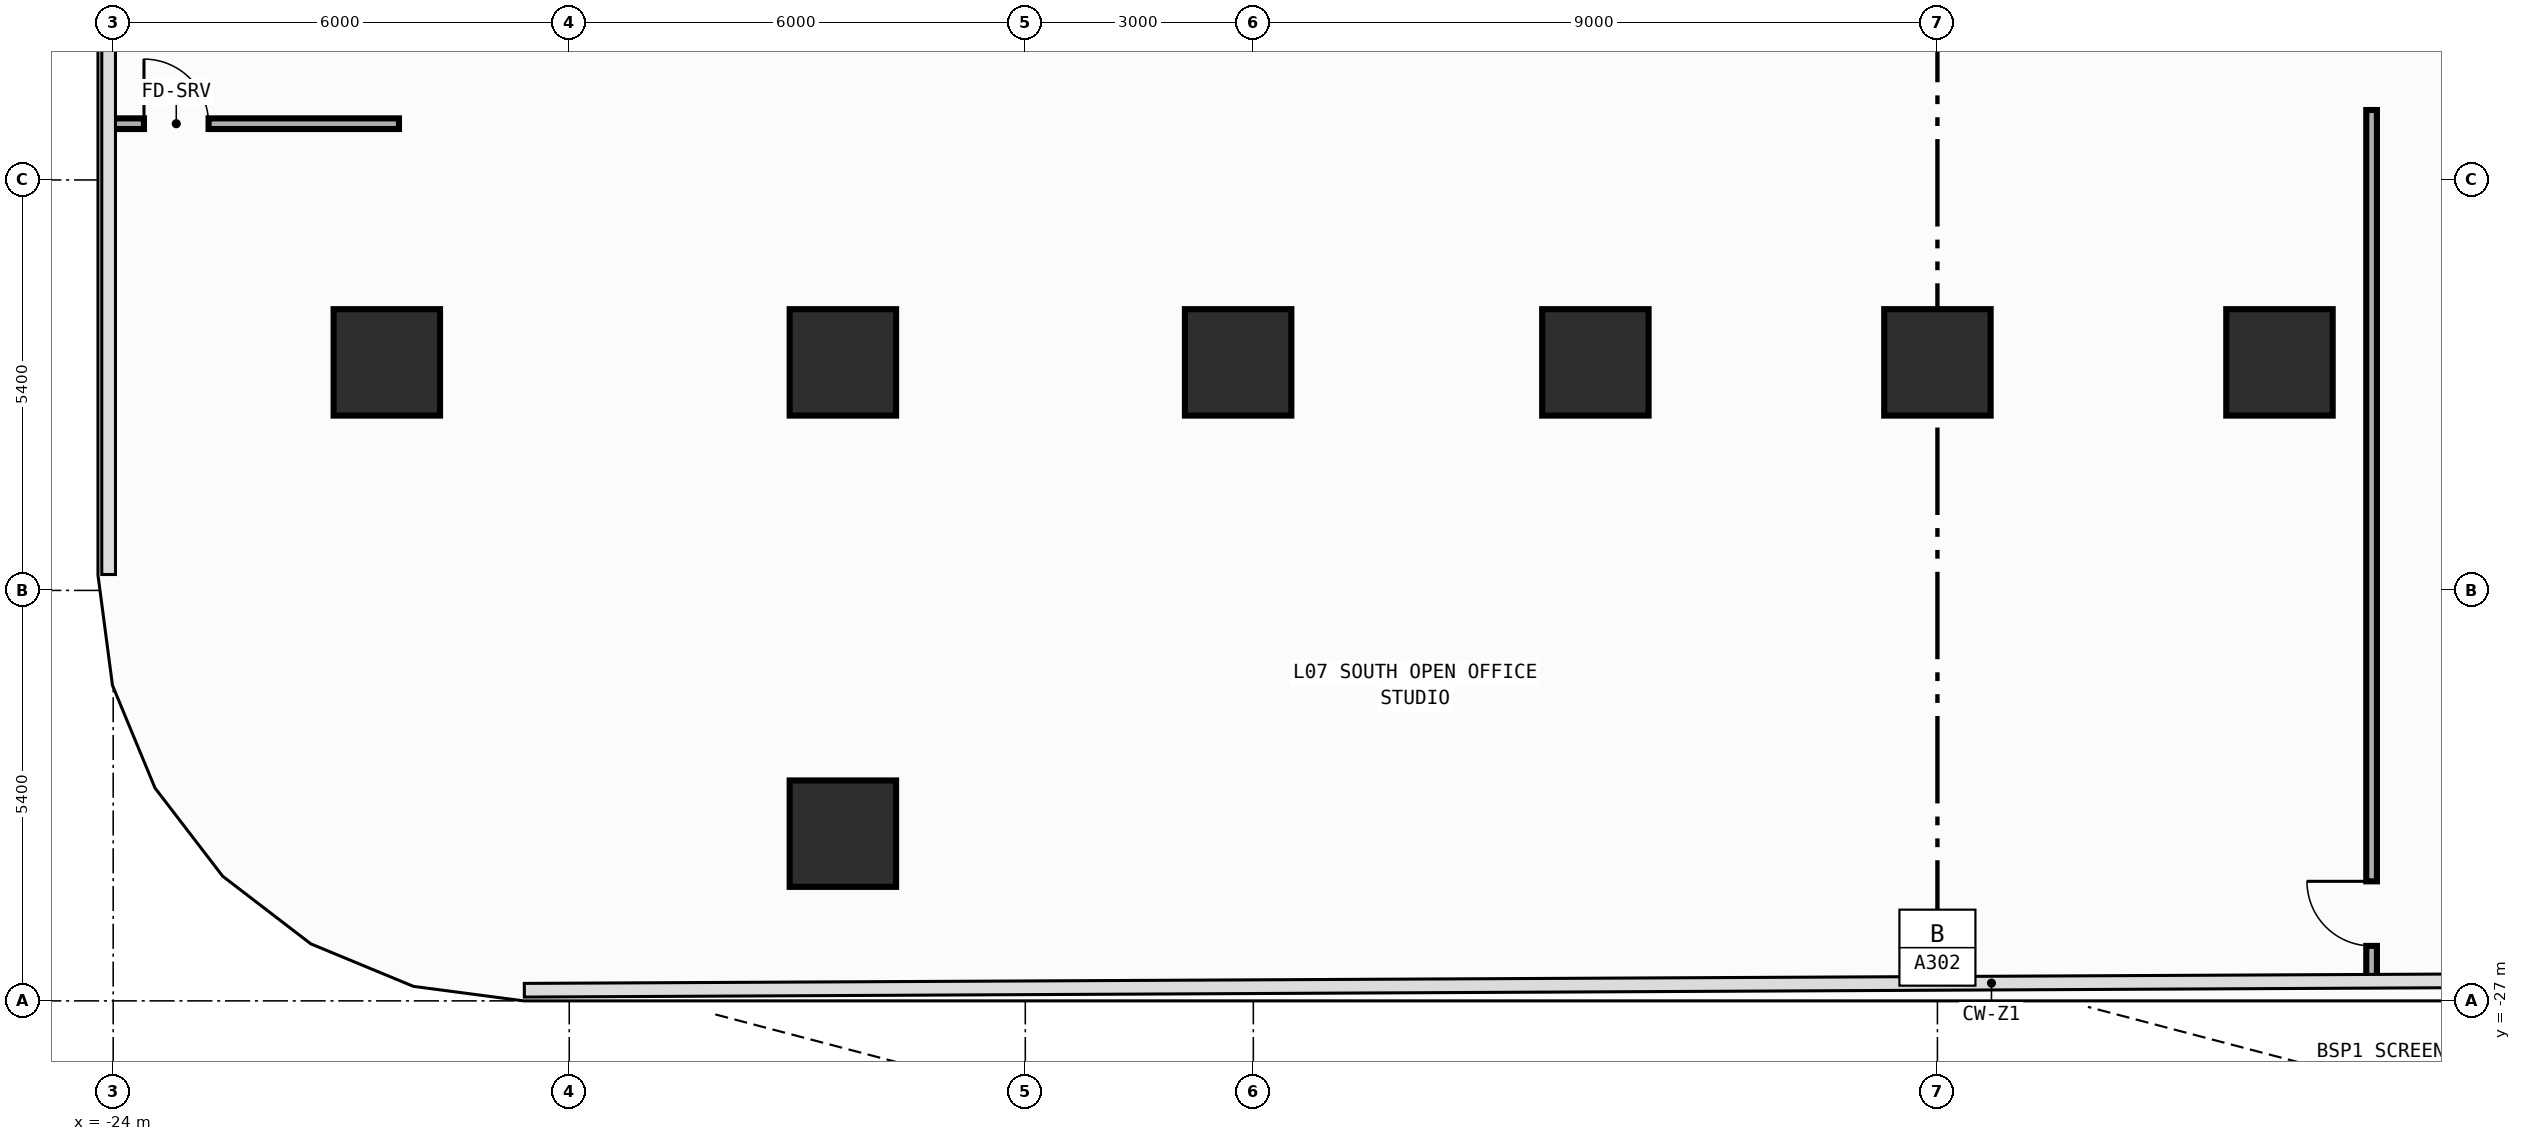
"""IFC4 building model, lengths in metres.
Left out: names, types, materials, properties, quantities, classifications, styles, units other than length and angle.
Written with IfcOpenShell. Run it as: python <this file> out.ifc"""

import sys

from ifc_helpers import new_model, si_unit, direction, frame, frame_2d, origin, origin_2d, place, context, subcontext, project, spatial, rectangle, extrude, element, fill, save


model = new_model("IFC4")
c1 = context("Model", 3, precision=1e-05, world=origin(), true_north=direction((0.0, 1.0)))
c2 = subcontext(c1, "Body", "Model", "MODEL_VIEW")
j1 = project(units=[si_unit("LENGTHUNIT", "METRE"), si_unit("PLANEANGLEUNIT", "RADIAN")], contexts=[c1])
p1 = place(None, origin())
s1 = spatial("IfcSite", under=j1, at=p1, CompositionType="ELEMENT")
p2 = place(p1, origin())
s2 = spatial("IfcBuilding", under=s1, at=p2, CompositionType="ELEMENT")
p3 = place(p2, frame((0.0, 0.0, 30.2)))
s3 = spatial("IfcBuildingStorey", under=s2, at=p3, CompositionType="ELEMENT", Elevation=30.2)
for number, where, z_axis, x_axis in (
    (1, (-9.2, -18.6, 0.0), (0.0, 0.0, 1.0), (1.0, 0.0, 0.0)),
    (2, (-20.4, -18.6, 0.0), (0.0, 0.0, 1.0), (1.0, 0.0, 0.0)),
    (3, (-14.4, -18.6, 0.0), (0.0, 0.0, 1.0), (1.0, 0.0, 0.0)),
    (4, (-4.5, -18.6, 0.0), (0.0, 0.0, 1.0), (1.0, 0.0, 0.0)),
    (5, (0.0, -18.6, 0.0), (0.0, 0.0, 1.0), (1.0, 0.0, 0.0)),
    (6, (4.5, -18.6, 0.0), (0.0, 0.0, 1.0), (1.0, 0.0, 0.0)),
    (7, (-14.4, -24.8, 0.0), (0.0, 0.0, 1.0), (1.0, 0.0, 0.0)),
):
    element("IfcColumn", number, at=place(p3, frame(where, z_axis=z_axis, x_axis=x_axis)), inside=s3, PredefinedType="COLUMN", context=c2, shape_type="SweptSolid", body=[
        extrude(rectangle(XDim=1.4, YDim=1.4, at=origin_2d()), origin(), (0.0, 0.0, 1.0), 4.2),
    ])
p4 = place(p3, frame((-24.055, -15.46, 0.0), z_axis=(0.0, 0.0, 1.0), x_axis=(1.0, 0.0, 0.0)))
e8 = element("IfcWall", 8, at=p4, inside=s3, PredefinedType="PARTITIONING", context=c2, shape_type="SweptSolid", body=[
    extrude(rectangle(XDim=3.815, YDim=0.14, at=frame_2d((1.907, 0.0))), origin(), (0.0, 0.0, 1.0), 3.94),
])
p5 = place(p4, frame((0.46, 0.0, 0.0)))
e9 = element("IfcOpeningElement", 9, at=p5, cuts=e8, PredefinedType="OPENING", context=c2, shape_type="SweptSolid", body=[
    extrude(rectangle(XDim=0.85, YDim=2.1, at=frame_2d((0.425, 1.05))), frame((0.0, 0.08, 0.0), z_axis=(0.0, -1.0, 0.0), x_axis=(1.0, 0.0, 0.0)), (0.0, 0.0, 1.0), 0.16),
])
p6 = place(p3, frame((5.712, -26.737, 0.0), z_axis=(0.0, 0.0, 1.0), x_axis=(0.0, 1.0, 0.0)))
e10 = element("IfcWall", 10, at=p6, inside=s3, PredefinedType="PARTITIONING", context=c2, shape_type="SweptSolid", body=[
    extrude(rectangle(XDim=11.457, YDim=0.14, at=frame_2d((5.729, 0.0))), origin(), (0.0, 0.0, 1.0), 3.94),
])
p7 = place(p6, frame((0.46, 0.0, 0.0)))
e11 = element("IfcOpeningElement", 11, at=p7, cuts=e10, PredefinedType="OPENING", context=c2, shape_type="SweptSolid", body=[
    extrude(rectangle(XDim=0.85, YDim=2.1, at=frame_2d((0.425, 1.05))), frame((0.0, 0.08, 0.0), z_axis=(0.0, -1.0, 0.0), x_axis=(1.0, 0.0, 0.0)), (0.0, 0.0, 1.0), 0.16),
])
p8 = place(p5, origin())
e12 = element("IfcDoor", 12, at=p8, inside=s3, OperationType="SINGLE_SWING_LEFT", PredefinedType="DOOR", context=c2, shape_type="SweptSolid", body=[
    extrude(rectangle(XDim=0.85, YDim=2.1, at=frame_2d((0.425, 1.05))), frame((0.0, 0.025, 0.0), z_axis=(0.0, -1.0, 0.0), x_axis=(1.0, 0.0, 0.0)), (0.0, 0.0, 1.0), 0.05),
])
fill(e9, e12)
p9 = place(p7, origin())
e13 = element("IfcDoor", 13, at=p9, inside=s3, OperationType="SINGLE_SWING_RIGHT", PredefinedType="DOOR", context=c2, shape_type="SweptSolid", body=[
    extrude(rectangle(XDim=0.85, YDim=2.1, at=frame_2d((0.425, 1.05))), frame((0.0, 0.025, 0.0), z_axis=(0.0, -1.0, 0.0), x_axis=(1.0, 0.0, 0.0)), (0.0, 0.0, 1.0), 0.05),
])
fill(e11, e13)
save(model, sys.argv[1])
